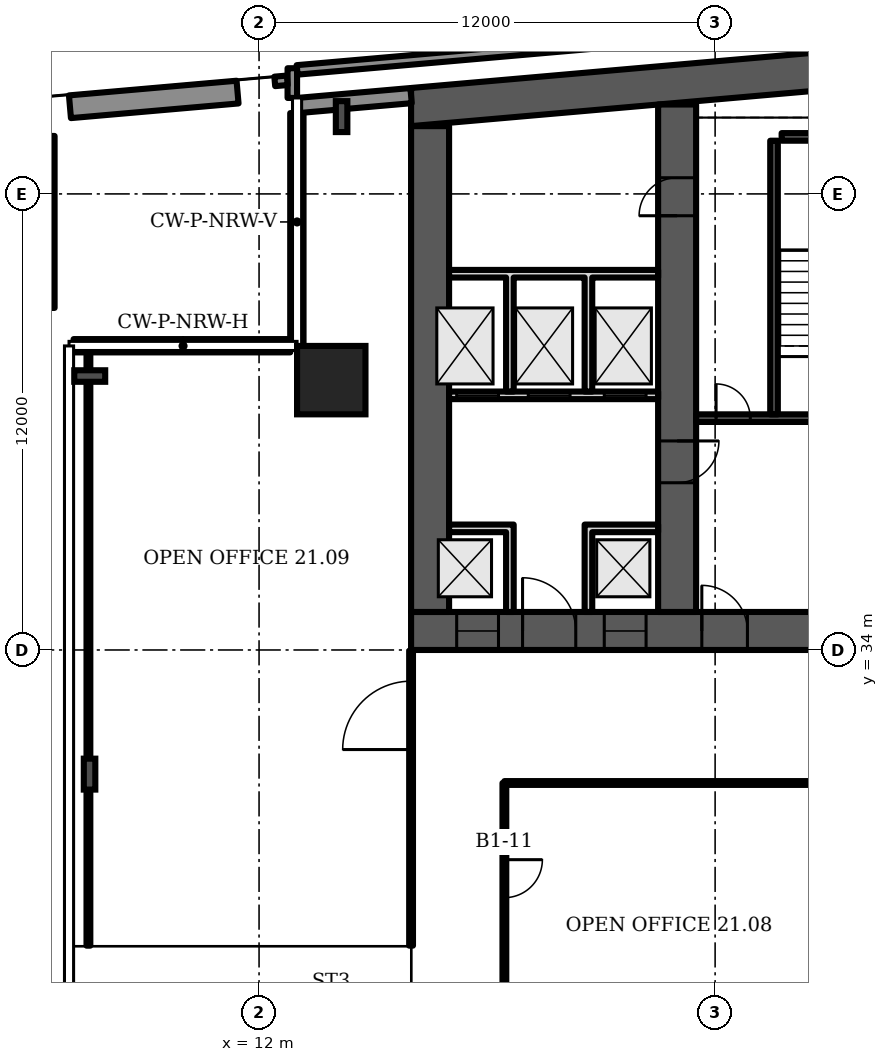
"""IFC4 building model, lengths in metres.
Left out: names, types, materials, properties, quantities, classifications, styles, units other than length and angle.
Written with IfcOpenShell. Run it as: python <this file> out.ifc"""

import sys

from ifc_helpers import new_model, si_unit, direction, frame, frame_2d, origin, origin_2d, place, context, subcontext, project, spatial, polyline, rectangle, i_section, outline, extrude, element, fill, save


model = new_model("IFC4")
c1 = context("Model", 3, precision=1e-05, world=origin(), true_north=direction((0.0, 1.0)))
c2 = subcontext(c1, "Body", "Model", "MODEL_VIEW")
j1 = project(units=[si_unit("LENGTHUNIT", "METRE"), si_unit("PLANEANGLEUNIT", "RADIAN")], contexts=[c1])
p1 = place(None, origin())
s1 = spatial("IfcSite", under=j1, at=p1, CompositionType="ELEMENT")
p2 = place(p1, origin())
s2 = spatial("IfcBuilding", under=s1, at=p2, CompositionType="ELEMENT")
p3 = place(p2, frame((0.0, 0.0, 96.7)))
s3 = spatial("IfcBuildingStorey", under=s2, at=p3, CompositionType="ELEMENT", Elevation=96.7)
p4 = place(p3, origin())
e1 = element("IfcWall", 1, at=p4, inside=s3, PredefinedType="SHEAR", context=c2, shape_type="SweptSolid", body=[
    extrude(outline(polyline([(16.0, 47.784), (40.5, 49.927), (65.0, 47.784), (65.0, 48.787), (40.5, 50.931), (16.0, 48.787), (16.0, 47.784)])), origin(), (0.0, 0.0, 1.0), 3.6),
])
p5 = place(p3, frame((16.0, 34.5, 0.0), z_axis=(0.0, 0.0, 1.0), x_axis=(1.0, 0.0, 0.0)))
e2 = element("IfcWall", 2, at=p5, inside=s3, PredefinedType="SHEAR", context=c2, shape_type="SweptSolid", body=[
    extrude(rectangle(XDim=49.0, YDim=1.0, at=frame_2d((24.5, 0.0))), origin(), (0.0, 0.0, 1.0), 3.6),
])
p6 = place(p5, frame((1.2, 0.0, 0.0)))
e3 = element("IfcOpeningElement", 3, at=p6, cuts=e2, PredefinedType="OPENING", context=c2, shape_type="SweptSolid", body=[
    extrude(rectangle(XDim=1.1, YDim=2.1, at=frame_2d((0.55, 1.05))), frame((0.0, 0.51, 0.0), z_axis=(0.0, -1.0, 0.0), x_axis=(1.0, 0.0, 0.0)), (0.0, 0.0, 1.0), 1.02),
])
p7 = place(p5, frame((5.083, 0.0, 0.0)))
e4 = element("IfcOpeningElement", 4, at=p7, cuts=e2, PredefinedType="OPENING", context=c2, shape_type="SweptSolid", body=[
    extrude(rectangle(XDim=1.1, YDim=2.1, at=frame_2d((0.55, 1.05))), frame((0.0, 0.51, 0.0), z_axis=(0.0, -1.0, 0.0), x_axis=(1.0, 0.0, 0.0)), (0.0, 0.0, 1.0), 1.02),
])
p8 = place(p5, frame((2.933, 0.0, 0.0)))
e5 = element("IfcOpeningElement", 5, at=p8, cuts=e2, PredefinedType="OPENING", context=c2, shape_type="SweptSolid", body=[
    extrude(rectangle(XDim=1.4, YDim=2.1, at=frame_2d((0.7, 1.05))), frame((0.0, 0.51, 0.0), z_axis=(0.0, -1.0, 0.0), x_axis=(1.0, 0.0, 0.0)), (0.0, 0.0, 1.0), 1.02),
])
p9 = place(p5, frame((7.65, 0.0, 0.0)))
e6 = element("IfcOpeningElement", 6, at=p9, cuts=e2, PredefinedType="OPENING", context=c2, shape_type="SweptSolid", body=[
    extrude(rectangle(XDim=1.2, YDim=2.1, at=frame_2d((0.6, 1.05))), frame((0.0, 0.51, 0.0), z_axis=(0.0, -1.0, 0.0), x_axis=(1.0, 0.0, 0.0)), (0.0, 0.0, 1.0), 1.02),
])
p10 = place(p5, frame((14.817, 0.0, 0.0)))
e7 = element("IfcOpeningElement", 7, at=p10, cuts=e2, PredefinedType="OPENING", context=c2, shape_type="SweptSolid", body=[
    extrude(rectangle(XDim=1.1, YDim=2.1, at=frame_2d((0.55, 1.05))), frame((0.0, 0.51, 0.0), z_axis=(0.0, -1.0, 0.0), x_axis=(1.0, 0.0, 0.0)), (0.0, 0.0, 1.0), 1.02),
])
p11 = place(p5, frame((19.083, 0.0, 0.0)))
e8 = element("IfcOpeningElement", 8, at=p11, cuts=e2, PredefinedType="OPENING", context=c2, shape_type="SweptSolid", body=[
    extrude(rectangle(XDim=1.1, YDim=2.1, at=frame_2d((0.55, 1.05))), frame((0.0, 0.51, 0.0), z_axis=(0.0, -1.0, 0.0), x_axis=(1.0, 0.0, 0.0)), (0.0, 0.0, 1.0), 1.02),
])
p12 = place(p5, frame((16.8, 0.0, 0.0)))
e9 = element("IfcOpeningElement", 9, at=p12, cuts=e2, PredefinedType="OPENING", context=c2, shape_type="SweptSolid", body=[
    extrude(rectangle(XDim=1.4, YDim=2.1, at=frame_2d((0.7, 1.05))), frame((0.0, 0.51, 0.0), z_axis=(0.0, -1.0, 0.0), x_axis=(1.0, 0.0, 0.0)), (0.0, 0.0, 1.0), 1.02),
])
p13 = place(p5, frame((21.817, 0.0, 0.0)))
e10 = element("IfcOpeningElement", 10, at=p13, cuts=e2, PredefinedType="OPENING", context=c2, shape_type="SweptSolid", body=[
    extrude(rectangle(XDim=1.1, YDim=2.1, at=frame_2d((0.55, 1.05))), frame((0.0, 0.51, 0.0), z_axis=(0.0, -1.0, 0.0), x_axis=(1.0, 0.0, 0.0)), (0.0, 0.0, 1.0), 1.02),
])
p14 = place(p5, frame((26.083, 0.0, 0.0)))
e11 = element("IfcOpeningElement", 11, at=p14, cuts=e2, PredefinedType="OPENING", context=c2, shape_type="SweptSolid", body=[
    extrude(rectangle(XDim=1.1, YDim=2.1, at=frame_2d((0.55, 1.05))), frame((0.0, 0.51, 0.0), z_axis=(0.0, -1.0, 0.0), x_axis=(1.0, 0.0, 0.0)), (0.0, 0.0, 1.0), 1.02),
])
p15 = place(p5, frame((33.15, 0.0, 0.0)))
e12 = element("IfcOpeningElement", 12, at=p15, cuts=e2, PredefinedType="OPENING", context=c2, shape_type="SweptSolid", body=[
    extrude(rectangle(XDim=1.2, YDim=2.1, at=frame_2d((0.6, 1.05))), frame((0.0, 0.51, 0.0), z_axis=(0.0, -1.0, 0.0), x_axis=(1.0, 0.0, 0.0)), (0.0, 0.0, 1.0), 1.02),
])
p16 = place(p5, frame((37.8, 0.0, 0.0)))
e13 = element("IfcOpeningElement", 13, at=p16, cuts=e2, PredefinedType="OPENING", context=c2, shape_type="SweptSolid", body=[
    extrude(rectangle(XDim=1.4, YDim=2.1, at=frame_2d((0.7, 1.05))), frame((0.0, 0.51, 0.0), z_axis=(0.0, -1.0, 0.0), x_axis=(1.0, 0.0, 0.0)), (0.0, 0.0, 1.0), 1.02),
])
p17 = place(p5, frame((42.817, 0.0, 0.0)))
e14 = element("IfcOpeningElement", 14, at=p17, cuts=e2, PredefinedType="OPENING", context=c2, shape_type="SweptSolid", body=[
    extrude(rectangle(XDim=1.1, YDim=2.1, at=frame_2d((0.55, 1.05))), frame((0.0, 0.51, 0.0), z_axis=(0.0, -1.0, 0.0), x_axis=(1.0, 0.0, 0.0)), (0.0, 0.0, 1.0), 1.02),
])
p18 = place(p5, frame((46.7, 0.0, 0.0)))
e15 = element("IfcOpeningElement", 15, at=p18, cuts=e2, PredefinedType="OPENING", context=c2, shape_type="SweptSolid", body=[
    extrude(rectangle(XDim=1.1, YDim=2.1, at=frame_2d((0.55, 1.05))), frame((0.0, 0.51, 0.0), z_axis=(0.0, -1.0, 0.0), x_axis=(1.0, 0.0, 0.0)), (0.0, 0.0, 1.0), 1.02),
])
p19 = place(p5, frame((44.667, 0.0, 0.0)))
e16 = element("IfcOpeningElement", 16, at=p19, cuts=e2, PredefinedType="OPENING", context=c2, shape_type="SweptSolid", body=[
    extrude(rectangle(XDim=1.4, YDim=2.1, at=frame_2d((0.7, 1.05))), frame((0.0, 0.51, 0.0), z_axis=(0.0, -1.0, 0.0), x_axis=(1.0, 0.0, 0.0)), (0.0, 0.0, 1.0), 1.02),
])
p20 = place(p3, frame((16.5, 35.0, 0.0), z_axis=(0.0, 0.0, 1.0), x_axis=(0.0, 1.0, 0.0)))
e17 = element("IfcWall", 17, at=p20, inside=s3, PredefinedType="SHEAR", context=c2, shape_type="SweptSolid", body=[
    extrude(rectangle(XDim=12.784, YDim=1.0, at=frame_2d((6.392, 0.0))), origin(), (0.0, 0.0, 1.0), 3.6),
])
p21 = place(p3, frame((23.0, 35.0, 0.0), z_axis=(0.0, 0.0, 1.0), x_axis=(0.0, 1.0, 0.0)))
e18 = element("IfcWall", 18, at=p21, inside=s3, PredefinedType="SHEAR", context=c2, shape_type="SweptSolid", body=[
    extrude(rectangle(XDim=13.352, YDim=1.0, at=frame_2d((6.676, 0.0))), origin(), (0.0, 0.0, 1.0), 3.6),
])
p22 = place(p21, frame((10.426, 0.0, 0.0)))
e19 = element("IfcOpeningElement", 19, at=p22, cuts=e18, PredefinedType="OPENING", context=c2, shape_type="SweptSolid", body=[
    extrude(rectangle(XDim=1.0, YDim=2.1, at=frame_2d((0.5, 1.05))), frame((0.0, 0.51, 0.0), z_axis=(0.0, -1.0, 0.0), x_axis=(1.0, 0.0, 0.0)), (0.0, 0.0, 1.0), 1.02),
])
p23 = place(p21, frame((3.4, 0.0, 0.0)))
e20 = element("IfcOpeningElement", 20, at=p23, cuts=e18, PredefinedType="OPENING", context=c2, shape_type="SweptSolid", body=[
    extrude(rectangle(XDim=1.1, YDim=2.1, at=frame_2d((0.55, 1.05))), frame((0.0, 0.51, 0.0), z_axis=(0.0, -1.0, 0.0), x_axis=(1.0, 0.0, 0.0)), (0.0, 0.0, 1.0), 1.02),
])
p24 = place(p3, frame((13.9, 41.1, 0.0), z_axis=(0.0, 0.0, 1.0), x_axis=(1.0, 0.0, 0.0)))
e21 = element("IfcColumn", 21, at=p24, inside=s3, PredefinedType="COLUMN", context=c2, shape_type="SweptSolid", body=[
    extrude(rectangle(XDim=1.8, YDim=1.8, at=origin_2d()), origin(), (0.0, 0.0, 1.0), 3.6),
])
for number, where, z_axis, x_axis in (
    (22, (14.172, 48.034, 0.0), (0.0, 0.0, 1.0), (-1.0, 0.0, 0.0)),
    (23, (7.544, 41.208, 0.0), (0.0, 0.0, 1.0), (0.0, 1.0, 0.0)),
    (24, (7.54, 30.733, 0.0), (0.0, 0.0, 1.0), (-1.0, 0.0, 0.0)),
):
    element("IfcColumn", number, at=place(p3, frame(where, z_axis=z_axis, x_axis=x_axis)), inside=s3, PredefinedType="COLUMN", context=c2, shape_type="SweptSolid", body=[
        extrude(i_section(OverallWidth=0.303, OverallDepth=0.814, WebThickness=0.021, FlangeThickness=0.04, FilletRadius=0.03, at=origin_2d()), origin(), (0.0, 0.0, 1.0), 3.6),
    ])
p25 = place(p3, frame((16.0, 48.587, 0.0), z_axis=(0.0, 0.0, 1.0), x_axis=(-0.996194, -0.087168, 0.0)))
e25 = element("IfcWall", 25, at=p25, inside=s3, PredefinedType="SOLIDWALL", context=c2, shape_type="SweptSolid", body=[
    extrude(rectangle(XDim=2.994, YDim=0.4, at=frame_2d((1.497, 0.0))), origin(), (0.0, 0.0, 1.0), 3.2),
])
p26 = place(p3, frame((13.0, 49.263, 0.0), z_axis=(0.0, 0.0, 1.0), x_axis=(0.996193, 0.087159, 0.0)))
e26 = element("IfcWall", 26, at=p26, inside=s3, PredefinedType="PARAPET", context=c2, shape_type="SweptSolid", body=[
    extrude(rectangle(XDim=24.092, YDim=0.25, at=frame_2d((12.046, 0.0))), origin(), (0.0, 0.0, 1.0), 1.1),
])
p27 = place(p3, frame((12.875, 48.525, 0.0), z_axis=(0.0, 0.0, 1.0), x_axis=(0.0, 1.0, 0.0)))
e27 = element("IfcWall", 27, at=p27, inside=s3, PredefinedType="PARAPET", context=c2, shape_type="SweptSolid", body=[
    extrude(rectangle(XDim=0.782, YDim=0.25, at=frame_2d((0.391, 0.0))), origin(), (0.0, 0.0, 1.0), 1.1),
])
p28 = place(p3, frame((12.742, 48.989, 0.0), z_axis=(0.0, 0.0, 1.0), x_axis=(-0.996186, -0.087268, 0.0)))
e28 = element("IfcWall", 28, at=p28, inside=s3, PredefinedType="PARAPET", context=c2, shape_type="SweptSolid", body=[
    extrude(rectangle(XDim=0.33, YDim=0.25, at=frame_2d((0.165, 0.0))), origin(), (0.0, 0.0, 1.0), 1.1),
])
p29 = place(p3, frame((6.32, 43.0, 0.0), z_axis=(0.0, 0.0, 1.0), x_axis=(0.0, 1.0, 0.0)))
e29 = element("IfcWall", 29, at=p29, inside=s3, PredefinedType="SOLIDWALL", context=c2, shape_type="SweptSolid", body=[
    extrude(rectangle(XDim=4.525, YDim=0.6, at=frame_2d((2.262, 0.0))), origin(), (0.0, 0.0, 1.0), 0.8),
])
p30 = place(p3, frame((7.024, 48.293, 0.0), z_axis=(0.0, 0.0, 1.0), x_axis=(0.996195, 0.087194, 0.0)))
e30 = element("IfcWall", 30, at=p30, inside=s3, PredefinedType="SOLIDWALL", context=c2, shape_type="SweptSolid", body=[
    extrude(rectangle(XDim=4.427, YDim=0.6, at=frame_2d((2.213, 0.0))), origin(), (0.0, 0.0, 1.0), 0.8),
])
p31 = place(p3, frame((12.995, 48.126, 0.0), z_axis=(0.0, 0.0, 1.0), x_axis=(0.0, -1.0, 0.0)))
e31 = element("IfcWall", 31, at=p31, inside=s3, PredefinedType="SOLIDWALL", context=c2, shape_type="SweptSolid", body=[
    extrude(rectangle(XDim=6.126, YDim=0.35, at=frame_2d((3.063, 0.0))), origin(), (0.0, 0.0, 1.0), 1.0),
])
p32 = place(p3, frame((12.82, 42.005, 0.0), z_axis=(0.0, 0.0, 1.0), x_axis=(-1.0, 0.0, 0.0)))
e32 = element("IfcWall", 32, at=p32, inside=s3, PredefinedType="SOLIDWALL", context=c2, shape_type="SweptSolid", body=[
    extrude(rectangle(XDim=5.7, YDim=0.35, at=frame_2d((2.85, 0.0))), origin(), (0.0, 0.0, 1.0), 1.0),
])
p33 = place(p3, frame((17.0, 40.7, 0.0), z_axis=(0.0, 0.0, 1.0), x_axis=(1.0, 0.0, 0.0)))
e33 = element("IfcWall", 33, at=p33, inside=s3, PredefinedType="PARTITIONING", context=c2, shape_type="SweptSolid", body=[
    extrude(rectangle(XDim=5.5, YDim=0.2, at=frame_2d((2.75, 0.0))), origin(), (0.0, 0.0, 1.0), 3.2),
])
p34 = place(p33, frame((0.2, 0.0, 0.0)))
e34 = element("IfcOpeningElement", 34, at=p34, cuts=e33, PredefinedType="OPENING", context=c2, shape_type="SweptSolid", body=[
    extrude(rectangle(XDim=1.1, YDim=2.1, at=frame_2d((0.55, 1.05))), frame((0.0, 0.11, 0.0), z_axis=(0.0, -1.0, 0.0), x_axis=(1.0, 0.0, 0.0)), (0.0, 0.0, 1.0), 0.22),
])
p35 = place(p33, frame((2.083, 0.0, 0.0)))
e35 = element("IfcOpeningElement", 35, at=p35, cuts=e33, PredefinedType="OPENING", context=c2, shape_type="SweptSolid", body=[
    extrude(rectangle(XDim=1.1, YDim=2.1, at=frame_2d((0.55, 1.05))), frame((0.0, 0.11, 0.0), z_axis=(0.0, -1.0, 0.0), x_axis=(1.0, 0.0, 0.0)), (0.0, 0.0, 1.0), 0.22),
])
p36 = place(p33, frame((4.083, 0.0, 0.0)))
e36 = element("IfcOpeningElement", 36, at=p36, cuts=e33, PredefinedType="OPENING", context=c2, shape_type="SweptSolid", body=[
    extrude(rectangle(XDim=1.1, YDim=2.1, at=frame_2d((0.55, 1.05))), frame((0.0, 0.11, 0.0), z_axis=(0.0, -1.0, 0.0), x_axis=(1.0, 0.0, 0.0)), (0.0, 0.0, 1.0), 0.22),
])
p37 = place(p3, frame((0.0, 0.0, -0.0)))
e37 = element("IfcWall", 37, at=p37, inside=s3, PredefinedType="PARTITIONING", context=c2, shape_type="SweptSolid", body=[
    extrude(outline(polyline([(18.5, 37.1), (17.0, 37.1), (17.0, 37.3), (18.5, 37.3), (18.7, 37.3), (18.7, 35.0), (18.5, 35.0), (18.5, 37.1)])), origin(), (0.0, 0.0, 1.0), 3.2),
])
p38 = place(p3, frame((0.0, 0.0, -0.0)))
e38 = element("IfcWall", 38, at=p38, inside=s3, PredefinedType="PARTITIONING", context=c2, shape_type="SweptSolid", body=[
    extrude(outline(polyline([(20.567, 37.3), (20.767, 37.3), (22.5, 37.3), (22.5, 37.1), (20.767, 37.1), (20.767, 35.0), (20.567, 35.0), (20.567, 37.3)])), origin(), (0.0, 0.0, 1.0), 3.2),
])
p39 = place(p3, frame((0.0, 0.0, -0.0)))
e39 = element("IfcWall", 39, at=p39, inside=s3, PredefinedType="PARTITIONING", context=c2, shape_type="SweptSolid", body=[
    extrude(outline(polyline([(18.7, 40.8), (18.5, 40.8), (18.5, 43.8), (17.0, 43.8), (17.0, 44.0), (22.5, 44.0), (22.5, 43.8), (20.767, 43.8), (20.767, 40.8), (20.567, 40.8), (20.567, 43.8), (18.7, 43.8), (18.7, 40.8)])), origin(), (0.0, 0.0, 1.0), 3.2),
])
p40 = place(p3, frame((23.5, 40.1, 0.0), z_axis=(0.0, 0.0, 1.0), x_axis=(1.0, 0.0, 0.0)))
e40 = element("IfcWall", 40, at=p40, inside=s3, PredefinedType="SHEAR", context=c2, shape_type="SweptSolid", body=[
    extrude(rectangle(XDim=6.0, YDim=0.2, at=frame_2d((3.0, 0.0))), origin(), (0.0, 0.0, 1.0), 3.2),
])
p41 = place(p40, frame((3.425, 0.0, 0.0)))
e41 = element("IfcOpeningElement", 41, at=p41, cuts=e40, PredefinedType="OPENING", context=c2, shape_type="SweptSolid", body=[
    extrude(rectangle(XDim=1.2, YDim=2.1, at=frame_2d((0.6, 1.05))), frame((0.0, 0.11, 0.0), z_axis=(0.0, -1.0, 0.0), x_axis=(1.0, 0.0, 0.0)), (0.0, 0.0, 1.0), 0.22),
])
p42 = place(p40, frame((0.525, 0.0, 0.0)))
e42 = element("IfcOpeningElement", 42, at=p42, cuts=e40, PredefinedType="OPENING", context=c2, shape_type="SweptSolid", body=[
    extrude(rectangle(XDim=0.9, YDim=2.1, at=frame_2d((0.45, 1.05))), frame((0.0, 0.11, 0.0), z_axis=(0.0, -1.0, 0.0), x_axis=(1.0, 0.0, 0.0)), (0.0, 0.0, 1.0), 0.22),
])
p43 = place(p3, frame((25.55, 40.2, 0.0), z_axis=(0.0, 0.0, 1.0), x_axis=(0.0, 1.0, 0.0)))
e43 = element("IfcWall", 43, at=p43, inside=s3, PredefinedType="SHEAR", context=c2, shape_type="SweptSolid", body=[
    extrude(rectangle(XDim=7.2, YDim=0.2, at=frame_2d((3.6, 0.0))), origin(), (0.0, 0.0, 1.0), 3.2),
])
p44 = place(p3, frame((25.75, 47.5, 0.0), z_axis=(0.0, 0.0, 1.0), x_axis=(1.0, 0.0, 0.0)))
e44 = element("IfcWall", 44, at=p44, inside=s3, PredefinedType="SHEAR", context=c2, shape_type="SweptSolid", body=[
    extrude(rectangle(XDim=3.75, YDim=0.2, at=frame_2d((1.875, 0.0))), origin(), (0.0, 0.0, 1.0), 3.2),
])
p45 = place(p3, frame((7.51, 26.22, 0.0), z_axis=(0.0, 0.0, 1.0), x_axis=(0.0, 1.0, 0.0)))
e45 = element("IfcWall", 45, at=p45, inside=s3, PredefinedType="PARTITIONING", context=c2, shape_type="SweptSolid", body=[
    extrude(rectangle(XDim=15.76, YDim=0.1, at=frame_2d((7.88, 0.0))), origin(), (0.0, 0.0, 1.0), 2.58),
])
p46 = place(p3, frame((16.0, 26.22, 0.0), z_axis=(0.0, 0.0, 1.0), x_axis=(0.0, 1.0, 0.0)))
e46 = element("IfcWall", 46, at=p46, inside=s3, PredefinedType="PARTITIONING", context=c2, shape_type="SweptSolid", body=[
    extrude(rectangle(XDim=7.76, YDim=0.1, at=frame_2d((3.88, 0.0))), origin(), (0.0, 0.0, 1.0), 3.2),
])
p47 = place(p46, frame((5.16, 0.0, 0.0)))
e47 = element("IfcOpeningElement", 47, at=p47, cuts=e46, PredefinedType="OPENING", context=c2, shape_type="SweptSolid", body=[
    extrude(rectangle(XDim=1.8, YDim=2.1, at=frame_2d((0.9, 1.05))), frame((0.0, 0.06, 0.0), z_axis=(0.0, -1.0, 0.0), x_axis=(1.0, 0.0, 0.0)), (0.0, 0.0, 1.0), 0.12),
])
p48 = place(p3, frame((18.455, 23.6, 0.0), z_axis=(0.0, 0.0, 1.0), x_axis=(0.0, 1.0, 0.0)))
e48 = element("IfcWall", 48, at=p48, inside=s3, PredefinedType="PARTITIONING", context=c2, shape_type="SweptSolid", body=[
    extrude(rectangle(XDim=6.9, YDim=0.1, at=frame_2d((3.45, 0.0))), origin(), (0.0, 0.0, 1.0), 3.2),
])
p49 = place(p48, frame((3.882, 0.0, 0.0)))
e49 = element("IfcOpeningElement", 49, at=p49, cuts=e48, PredefinedType="OPENING", context=c2, shape_type="SweptSolid", body=[
    extrude(rectangle(XDim=1.0, YDim=2.1, at=frame_2d((0.5, 1.05))), frame((0.0, 0.06, 0.0), z_axis=(0.0, -1.0, 0.0), x_axis=(1.0, 0.0, 0.0)), (0.0, 0.0, 1.0), 0.12),
])
p50 = place(p3, frame((18.455, 30.5, 0.0), z_axis=(0.0, 0.0, 1.0), x_axis=(1.0, 0.0, 0.0)))
e50 = element("IfcWall", 50, at=p50, inside=s3, PredefinedType="PARTITIONING", context=c2, shape_type="SweptSolid", body=[
    extrude(rectangle(XDim=18.395, YDim=0.1, at=frame_2d((9.198, 0.0))), origin(), (0.0, 0.0, 1.0), 3.2),
])
p51 = place(p50, frame((16.39, 0.0, 0.0)))
e51 = element("IfcOpeningElement", 51, at=p51, cuts=e50, PredefinedType="OPENING", context=c2, shape_type="SweptSolid", body=[
    extrude(rectangle(XDim=1.0, YDim=2.1, at=frame_2d((0.5, 1.05))), frame((0.0, 0.06, 0.0), z_axis=(0.0, -1.0, 0.0), x_axis=(1.0, 0.0, 0.0)), (0.0, 0.0, 1.0), 0.12),
])
p52 = place(p6, origin())
e52 = element("IfcDoor", 52, at=p52, inside=s3, OperationType="DOUBLE_DOOR_SLIDING", PredefinedType="DOOR", context=c2, shape_type="SweptSolid", body=[
    extrude(rectangle(XDim=1.1, YDim=2.1, at=frame_2d((0.55, 1.05))), frame((0.0, 0.025, 0.0), z_axis=(0.0, -1.0, 0.0), x_axis=(1.0, 0.0, 0.0)), (0.0, 0.0, 1.0), 0.05),
])
fill(e3, e52)
p53 = place(p7, origin())
e53 = element("IfcDoor", 53, at=p53, inside=s3, OperationType="DOUBLE_DOOR_SLIDING", PredefinedType="DOOR", context=c2, shape_type="SweptSolid", body=[
    extrude(rectangle(XDim=1.1, YDim=2.1, at=frame_2d((0.55, 1.05))), frame((0.0, 0.025, 0.0), z_axis=(0.0, -1.0, 0.0), x_axis=(1.0, 0.0, 0.0)), (0.0, 0.0, 1.0), 0.05),
])
fill(e4, e53)
p54 = place(p8, origin())
e54 = element("IfcDoor", 54, at=p54, inside=s3, OperationType="DOUBLE_DOOR_SINGLE_SWING", PredefinedType="DOOR", context=c2, shape_type="SweptSolid", body=[
    extrude(rectangle(XDim=1.4, YDim=2.1, at=frame_2d((0.7, 1.05))), frame((0.0, 0.025, 0.0), z_axis=(0.0, -1.0, 0.0), x_axis=(1.0, 0.0, 0.0)), (0.0, 0.0, 1.0), 0.05),
])
fill(e5, e54)
p55 = place(p34, origin())
e55 = element("IfcDoor", 55, at=p55, inside=s3, OperationType="DOUBLE_DOOR_SLIDING", PredefinedType="DOOR", context=c2, shape_type="SweptSolid", body=[
    extrude(rectangle(XDim=1.1, YDim=2.1, at=frame_2d((0.55, 1.05))), frame((0.0, 0.025, 0.0), z_axis=(0.0, -1.0, 0.0), x_axis=(1.0, 0.0, 0.0)), (0.0, 0.0, 1.0), 0.05),
])
fill(e34, e55)
p56 = place(p35, origin())
e56 = element("IfcDoor", 56, at=p56, inside=s3, OperationType="DOUBLE_DOOR_SLIDING", PredefinedType="DOOR", context=c2, shape_type="SweptSolid", body=[
    extrude(rectangle(XDim=1.1, YDim=2.1, at=frame_2d((0.55, 1.05))), frame((0.0, 0.025, 0.0), z_axis=(0.0, -1.0, 0.0), x_axis=(1.0, 0.0, 0.0)), (0.0, 0.0, 1.0), 0.05),
])
fill(e35, e56)
p57 = place(p36, origin())
e57 = element("IfcDoor", 57, at=p57, inside=s3, OperationType="DOUBLE_DOOR_SLIDING", PredefinedType="DOOR", context=c2, shape_type="SweptSolid", body=[
    extrude(rectangle(XDim=1.1, YDim=2.1, at=frame_2d((0.55, 1.05))), frame((0.0, 0.025, 0.0), z_axis=(0.0, -1.0, 0.0), x_axis=(1.0, 0.0, 0.0)), (0.0, 0.0, 1.0), 0.05),
])
fill(e36, e57)
p58 = place(p22, origin())
e58 = element("IfcDoor", 58, at=p58, inside=s3, OperationType="SINGLE_SWING_LEFT", PredefinedType="DOOR", context=c2, shape_type="SweptSolid", body=[
    extrude(rectangle(XDim=1.0, YDim=2.1, at=frame_2d((0.5, 1.05))), frame((0.0, 0.5, 0.0), z_axis=(0.0, -1.0, 0.0), x_axis=(1.0, 0.0, 0.0)), (0.0, 0.0, 1.0), 1.0),
])
fill(e19, e58)
p59 = place(p42, origin())
e59 = element("IfcDoor", 59, at=p59, inside=s3, OperationType="SINGLE_SWING_LEFT", PredefinedType="DOOR", context=c2, shape_type="SweptSolid", body=[
    extrude(rectangle(XDim=0.9, YDim=2.1, at=frame_2d((0.45, 1.05))), frame((0.0, 0.025, 0.0), z_axis=(0.0, -1.0, 0.0), x_axis=(1.0, 0.0, 0.0)), (0.0, 0.0, 1.0), 0.05),
])
fill(e42, e59)
p60 = place(p9, origin())
e60 = element("IfcDoor", 60, at=p60, inside=s3, OperationType="SINGLE_SWING_LEFT", PredefinedType="DOOR", context=c2, shape_type="SweptSolid", body=[
    extrude(rectangle(XDim=1.2, YDim=2.1, at=frame_2d((0.6, 1.05))), frame((0.0, 0.025, 0.0), z_axis=(0.0, -1.0, 0.0), x_axis=(1.0, 0.0, 0.0)), (0.0, 0.0, 1.0), 0.05),
])
fill(e6, e60)
p61 = place(p23, origin())
e61 = element("IfcDoor", 61, at=p61, inside=s3, OperationType="SINGLE_SWING_RIGHT", PredefinedType="DOOR", context=c2, shape_type="SweptSolid", body=[
    extrude(rectangle(XDim=1.1, YDim=2.1, at=frame_2d((0.55, 1.05))), frame((0.0, 0.025, 0.0), z_axis=(0.0, -1.0, 0.0), x_axis=(1.0, 0.0, 0.0)), (0.0, 0.0, 1.0), 0.05),
])
fill(e20, e61)
p62 = place(p49, origin())
e62 = element("IfcDoor", 62, at=p62, inside=s3, OperationType="SINGLE_SWING_RIGHT", PredefinedType="DOOR", context=c2, shape_type="SweptSolid", body=[
    extrude(rectangle(XDim=1.0, YDim=2.1, at=frame_2d((0.5, 1.05))), frame((0.0, 0.025, 0.0), z_axis=(0.0, -1.0, 0.0), x_axis=(1.0, 0.0, 0.0)), (0.0, 0.0, 1.0), 0.05),
])
fill(e49, e62)
p63 = place(p47, origin())
e63 = element("IfcDoor", 63, at=p63, inside=s3, OperationType="DOUBLE_DOOR_SINGLE_SWING", PredefinedType="DOOR", context=c2, shape_type="SweptSolid", body=[
    extrude(rectangle(XDim=1.8, YDim=2.1, at=frame_2d((0.9, 1.05))), frame((0.0, 0.025, 0.0), z_axis=(0.0, -1.0, 0.0), x_axis=(1.0, 0.0, 0.0)), (0.0, 0.0, 1.0), 0.05),
])
fill(e47, e63)
save(model, sys.argv[1])
